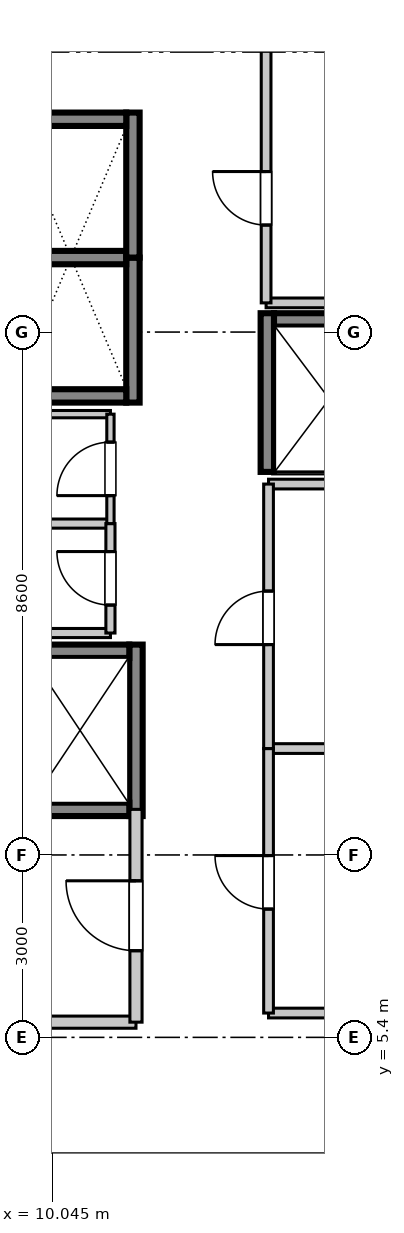
"""IFC4 building model, lengths in metres.
Left out: names, types, materials, properties, quantities, classifications, styles, units other than length and angle.
Written with IfcOpenShell. Run it as: python <this file> out.ifc"""

import sys

from ifc_helpers import new_model, si_unit, direction, frame, frame_2d, origin, place, context, subcontext, project, spatial, rectangle, extrude, source, transform, mapped, element, fill, save


model = new_model("IFC4")
c1 = context("Model", 3, precision=1e-05, world=origin(), true_north=direction((0.0, 1.0)))
c2 = subcontext(c1, "Body", "Model", "MODEL_VIEW")
j1 = project(units=[si_unit("LENGTHUNIT", "METRE"), si_unit("PLANEANGLEUNIT", "RADIAN")], contexts=[c1])
p1 = place(None, origin())
s1 = spatial("IfcSite", under=j1, at=p1, CompositionType="ELEMENT")
p2 = place(p1, origin())
s2 = spatial("IfcBuilding", under=s1, at=p2, CompositionType="ELEMENT")
p3 = place(p2, frame((0.0, 0.0, 300.35)))
s3 = spatial("IfcBuildingStorey", under=s2, at=p3, CompositionType="ELEMENT", Elevation=300.35)
m1 = source(origin(), c2, "Body", "SweptSolid", [
    extrude(rectangle(XDim=2.385, YDim=0.22, at=frame_2d((1.192, 0.0))), origin(), (0.0, 0.0, 1.0), 3.55),
])
p4 = place(p3, frame((11.37, 15.84, 0.0), z_axis=(0.0, 0.0, 1.0), x_axis=(0.0, 1.0, 0.0)))
e1 = element("IfcWall", 1, at=p4, inside=s3, PredefinedType="SHEAR", context=c2, shape_type="MappedRepresentation", body=[
    mapped(m1, transform((0.0, 0.0, 0.0), scale=1.0)),
])
m2 = source(origin(), c2, "Body", "SweptSolid", [
    extrude(rectangle(XDim=1.82, YDim=0.22, at=frame_2d((0.91, 0.0))), origin(), (0.0, 0.0, 1.0), 3.55),
])
p5 = place(p3, frame((9.44, 15.95, 0.0), z_axis=(0.0, 0.0, 1.0), x_axis=(1.0, 0.0, 0.0)))
e2 = element("IfcWall", 2, at=p5, inside=s3, PredefinedType="SHEAR", context=c2, shape_type="MappedRepresentation", body=[
    mapped(m2, transform((0.0, 0.0, 0.0), scale=1.0)),
])
m3 = source(origin(), c2, "Body", "SweptSolid", [
    extrude(rectangle(XDim=1.82, YDim=0.22, at=frame_2d((0.91, 0.0))), origin(), (0.0, 0.0, 1.0), 3.85),
])
p6 = place(p3, frame((9.44, 18.225, 0.0), z_axis=(0.0, 0.0, 1.0), x_axis=(1.0, 0.0, 0.0)))
e3 = element("IfcWall", 3, at=p6, inside=s3, PredefinedType="SHEAR", context=c2, shape_type="MappedRepresentation", body=[
    mapped(m3, transform((0.0, 0.0, 0.0), scale=1.0)),
])
p7 = place(p3, frame((11.37, 18.225, 0.0), z_axis=(0.0, 0.0, 1.0), x_axis=(0.0, 1.0, 0.0)))
e4 = element("IfcWall", 4, at=p7, inside=s3, PredefinedType="SHEAR", context=c2, shape_type="MappedRepresentation", body=[
    mapped(m1, transform((0.0, 0.0, 0.0), scale=1.0)),
])
p8 = place(p3, frame((9.44, 20.5, 0.0), z_axis=(0.0, 0.0, 1.0), x_axis=(1.0, 0.0, 0.0)))
e5 = element("IfcWall", 5, at=p8, inside=s3, PredefinedType="SHEAR", context=c2, shape_type="MappedRepresentation", body=[
    mapped(m2, transform((0.0, 0.0, 0.0), scale=1.0)),
])
m4 = source(origin(), c2, "Body", "SweptSolid", [
    extrude(rectangle(XDim=2.82, YDim=0.22, at=frame_2d((1.41, 0.0))), origin(), (0.0, 0.0, 1.0), 3.55),
])
p9 = place(p3, frame((11.42, 9.04, 0.0), z_axis=(0.0, 0.0, 1.0), x_axis=(0.0, 1.0, 0.0)))
e6 = element("IfcWall", 6, at=p9, inside=s3, PredefinedType="SHEAR", context=c2, shape_type="MappedRepresentation", body=[
    mapped(m4, transform((0.0, 0.0, 0.0), scale=1.0)),
])
m5 = source(origin(), c2, "Body", "SweptSolid", [
    extrude(rectangle(XDim=1.62, YDim=0.22, at=frame_2d((0.81, 0.0))), origin(), (0.0, 0.0, 1.0), 3.55),
])
for number, where, z_axis, x_axis in (
    (7, (9.69, 9.15, 0.0), (0.0, 0.0, 1.0), (1.0, 0.0, 0.0)),
    (8, (9.69, 11.75, 0.0), (0.0, 0.0, 1.0), (1.0, 0.0, 0.0)),
):
    element("IfcWall", number, at=place(p3, frame(where, z_axis=z_axis, x_axis=x_axis)), inside=s3, PredefinedType="SHEAR", context=c2, shape_type="MappedRepresentation", body=[
        mapped(m5, transform((0.0, 0.0, 0.0), scale=1.0)),
    ])
m6 = source(origin(), c2, "Body", "SweptSolid", [
    extrude(rectangle(XDim=2.61, YDim=0.22, at=frame_2d((1.305, 0.0))), origin(), (0.0, 0.0, 1.0), 3.55),
])
p10 = place(p3, frame((13.58, 14.7, 0.0), z_axis=(0.0, 0.0, 1.0), x_axis=(0.0, 1.0, 0.0)))
e9 = element("IfcWall", 9, at=p10, inside=s3, PredefinedType="SHEAR", context=c2, shape_type="MappedRepresentation", body=[
    mapped(m6, transform((0.0, 0.0, 0.0), scale=1.0)),
])
p11 = place(p3, frame((13.69, 17.2, 0.0), z_axis=(0.0, 0.0, 1.0), x_axis=(1.0, 0.0, 0.0)))
e10 = element("IfcWall", 10, at=p11, inside=s3, PredefinedType="SHEAR", context=c2, shape_type="MappedRepresentation", body=[
    mapped(m2, transform((0.0, 0.0, 0.0), scale=1.0)),
])
m7 = source(origin(), c2, "Body", "SweptSolid", [
    extrude(rectangle(XDim=3.82, YDim=0.2, at=frame_2d((1.91, 0.0))), origin(), (0.0, 0.0, 1.0), 2.89),
])
p12 = place(p3, frame((7.6, 5.65, 0.0), z_axis=(0.0, 0.0, 1.0), x_axis=(1.0, 0.0, 0.0)))
e11 = element("IfcWall", 11, at=p12, inside=s3, PredefinedType="PARTITIONING", context=c2, shape_type="MappedRepresentation", body=[
    mapped(m7, transform((0.0, 0.0, 0.0), scale=1.0)),
])
m8 = source(origin(), c2, "Body", "SweptSolid", [
    extrude(rectangle(XDim=3.5, YDim=0.2, at=frame_2d((1.75, 0.0))), origin(), (0.0, 0.0, 1.0), 2.89),
])
p13 = place(p3, frame((11.42, 5.65, 0.0), z_axis=(0.0, 0.0, 1.0), x_axis=(0.0, 1.0, 0.0)))
e12 = element("IfcWall", 12, at=p13, inside=s3, PredefinedType="PARTITIONING", context=c2, shape_type="MappedRepresentation", body=[
    mapped(m8, transform((0.0, 0.0, 0.0), scale=1.0)),
])
p14 = place(p13, frame((1.175, 0.0, 0.0)))
e13 = element("IfcOpeningElement", 13, at=p14, cuts=e12, PredefinedType="OPENING", context=c2, shape_type="SweptSolid", body=[
    extrude(rectangle(XDim=1.15, YDim=2.15, at=frame_2d((0.575, 1.075))), frame((0.0, 0.11, 0.0), z_axis=(0.0, -1.0, 0.0), x_axis=(1.0, 0.0, 0.0)), (0.0, 0.0, 1.0), 0.22),
])
m9 = source(origin(), c2, "Body", "SweptSolid", [
    extrude(rectangle(XDim=1.75, YDim=0.15, at=frame_2d((0.875, 0.0))), origin(), (0.0, 0.0, 1.0), 2.89),
])
for number, where, z_axis, x_axis in (
    (14, (9.25, 12.05, 0.0), (0.0, 0.0, 1.0), (1.0, 0.0, 0.0)),
    (15, (9.25, 13.85, 0.0), (0.0, 0.0, 1.0), (1.0, 0.0, 0.0)),
):
    element("IfcWall", number, at=place(p3, frame(where, z_axis=z_axis, x_axis=x_axis)), inside=s3, PredefinedType="PARTITIONING", context=c2, shape_type="MappedRepresentation", body=[
        mapped(m9, transform((0.0, 0.0, 0.0), scale=1.0)),
    ])
m10 = source(origin(), c2, "Body", "SweptSolid", [
    extrude(rectangle(XDim=1.8, YDim=0.15, at=frame_2d((0.9, 0.0))), origin(), (0.0, 0.0, 1.0), 2.89),
])
p15 = place(p3, frame((11.0, 12.05, 0.0), z_axis=(0.0, 0.0, 1.0), x_axis=(0.0, 1.0, 0.0)))
e16 = element("IfcWall", 16, at=p15, inside=s3, PredefinedType="PARTITIONING", context=c2, shape_type="MappedRepresentation", body=[
    mapped(m10, transform((0.0, 0.0, 0.0), scale=1.0)),
])
p16 = place(p15, frame((0.46, 0.0, 0.0)))
e17 = element("IfcOpeningElement", 17, at=p16, cuts=e16, PredefinedType="OPENING", context=c2, shape_type="SweptSolid", body=[
    extrude(rectangle(XDim=0.88, YDim=2.1, at=frame_2d((0.44, 1.05))), frame((0.0, 0.085, 0.0), z_axis=(0.0, -1.0, 0.0), x_axis=(1.0, 0.0, 0.0)), (0.0, 0.0, 1.0), 0.17),
])
m11 = source(origin(), c2, "Body", "SweptSolid", [
    extrude(rectangle(XDim=1.75, YDim=0.12, at=frame_2d((0.875, 0.0))), origin(), (0.0, 0.0, 1.0), 2.89),
])
p17 = place(p3, frame((9.25, 15.65, 0.0), z_axis=(0.0, 0.0, 1.0), x_axis=(1.0, 0.0, 0.0)))
e18 = element("IfcWall", 18, at=p17, inside=s3, PredefinedType="PARTITIONING", context=c2, shape_type="MappedRepresentation", body=[
    mapped(m11, transform((0.0, 0.0, 0.0), scale=1.0)),
])
m12 = source(origin(), c2, "Body", "SweptSolid", [
    extrude(rectangle(XDim=1.8, YDim=0.12, at=frame_2d((0.9, 0.0))), origin(), (0.0, 0.0, 1.0), 2.89),
])
p18 = place(p3, frame((11.0, 13.85, 0.0), z_axis=(0.0, 0.0, 1.0), x_axis=(0.0, 1.0, 0.0)))
e19 = element("IfcWall", 19, at=p18, inside=s3, PredefinedType="PARTITIONING", context=c2, shape_type="MappedRepresentation", body=[
    mapped(m12, transform((0.0, 0.0, 0.0), scale=1.0)),
])
p19 = place(p18, frame((0.46, 0.0, 0.0)))
e20 = element("IfcOpeningElement", 20, at=p19, cuts=e19, PredefinedType="OPENING", context=c2, shape_type="SweptSolid", body=[
    extrude(rectangle(XDim=0.88, YDim=2.1, at=frame_2d((0.44, 1.05))), frame((0.0, 0.07, 0.0), z_axis=(0.0, -1.0, 0.0), x_axis=(1.0, 0.0, 0.0)), (0.0, 0.0, 1.0), 0.14),
])
m13 = source(origin(), c2, "Body", "SweptSolid", [
    extrude(rectangle(XDim=2.05, YDim=0.16, at=frame_2d((1.025, 0.0))), origin(), (0.0, 0.0, 1.0), 2.89),
])
for number, where, z_axis, x_axis in (
    (21, (13.6, 5.8, 0.0), (0.0, 0.0, 1.0), (1.0, 0.0, 0.0)),
    (22, (13.6, 10.15, 0.0), (0.0, 0.0, 1.0), (1.0, 0.0, 0.0)),
):
    element("IfcWall", number, at=place(p3, frame(where, z_axis=z_axis, x_axis=x_axis)), inside=s3, PredefinedType="PARTITIONING", context=c2, shape_type="MappedRepresentation", body=[
        mapped(m13, transform((0.0, 0.0, 0.0), scale=1.0)),
    ])
m14 = source(origin(), c2, "Body", "SweptSolid", [
    extrude(rectangle(XDim=4.35, YDim=0.16, at=frame_2d((2.175, 0.0))), origin(), (0.0, 0.0, 1.0), 2.89),
])
p20 = place(p3, frame((13.6, 5.8, 0.0), z_axis=(0.0, 0.0, 1.0), x_axis=(0.0, 1.0, 0.0)))
e23 = element("IfcWall", 23, at=p20, inside=s3, PredefinedType="PARTITIONING", context=c2, shape_type="MappedRepresentation", body=[
    mapped(m14, transform((0.0, 0.0, 0.0), scale=1.0)),
])
p21 = place(p20, frame((1.71, 0.0, 0.0)))
e24 = element("IfcOpeningElement", 24, at=p21, cuts=e23, PredefinedType="OPENING", context=c2, shape_type="SweptSolid", body=[
    extrude(rectangle(XDim=0.88, YDim=2.1, at=frame_2d((0.44, 1.05))), frame((0.0, 0.09, 0.0), z_axis=(0.0, -1.0, 0.0), x_axis=(1.0, 0.0, 0.0)), (0.0, 0.0, 1.0), 0.18),
])
p22 = place(p3, frame((13.6, 14.5, 0.0), z_axis=(0.0, 0.0, 1.0), x_axis=(1.0, 0.0, 0.0)))
e25 = element("IfcWall", 25, at=p22, inside=s3, PredefinedType="PARTITIONING", context=c2, shape_type="MappedRepresentation", body=[
    mapped(m13, transform((0.0, 0.0, 0.0), scale=1.0)),
])
m15 = source(origin(), c2, "Body", "SweptSolid", [
    extrude(rectangle(XDim=4.35, YDim=0.16, at=frame_2d((2.175, 0.0))), origin(), (0.0, 0.0, 1.0), 2.89),
])
p23 = place(p3, frame((13.6, 10.15, 0.0), z_axis=(0.0, 0.0, 1.0), x_axis=(0.0, 1.0, 0.0)))
e26 = element("IfcWall", 26, at=p23, inside=s3, PredefinedType="PARTITIONING", context=c2, shape_type="MappedRepresentation", body=[
    mapped(m15, transform((0.0, 0.0, 0.0), scale=1.0)),
])
p24 = place(p23, frame((1.71, 0.0, 0.0)))
e27 = element("IfcOpeningElement", 27, at=p24, cuts=e26, PredefinedType="OPENING", context=c2, shape_type="SweptSolid", body=[
    extrude(rectangle(XDim=0.88, YDim=2.1, at=frame_2d((0.44, 1.05))), frame((0.0, 0.09, 0.0), z_axis=(0.0, -1.0, 0.0), x_axis=(1.0, 0.0, 0.0)), (0.0, 0.0, 1.0), 0.18),
])
m16 = source(origin(), c2, "Body", "SweptSolid", [
    extrude(rectangle(XDim=2.99, YDim=0.16, at=frame_2d((1.495, 0.0))), origin(), (0.0, 0.0, 1.0), 2.89),
])
p25 = place(p3, frame((13.56, 17.48, 0.0), z_axis=(0.0, 0.0, 1.0), x_axis=(1.0, 0.0, 0.0)))
e28 = element("IfcWall", 28, at=p25, inside=s3, PredefinedType="PARTITIONING", context=c2, shape_type="MappedRepresentation", body=[
    mapped(m16, transform((0.0, 0.0, 0.0), scale=1.0)),
])
m17 = source(origin(), c2, "Body", "SweptSolid", [
    extrude(rectangle(XDim=4.82, YDim=0.16, at=frame_2d((2.41, 0.0))), origin(), (0.0, 0.0, 1.0), 2.89),
])
p26 = place(p3, frame((13.56, 17.48, 0.0), z_axis=(0.0, 0.0, 1.0), x_axis=(0.0, 1.0, 0.0)))
e29 = element("IfcWall", 29, at=p26, inside=s3, PredefinedType="PARTITIONING", context=c2, shape_type="MappedRepresentation", body=[
    mapped(m17, transform((0.0, 0.0, 0.0), scale=1.0)),
])
p27 = place(p26, frame((1.28, 0.0, 0.0)))
e30 = element("IfcOpeningElement", 30, at=p27, cuts=e29, PredefinedType="OPENING", context=c2, shape_type="SweptSolid", body=[
    extrude(rectangle(XDim=0.88, YDim=2.1, at=frame_2d((0.44, 1.05))), frame((0.0, 0.09, 0.0), z_axis=(0.0, -1.0, 0.0), x_axis=(1.0, 0.0, 0.0)), (0.0, 0.0, 1.0), 0.18),
])
m18 = source(origin(), c2, "Body", "SweptSolid", [
    extrude(rectangle(XDim=1.15, YDim=2.15, at=frame_2d((0.575, 1.075))), frame((0.0, 0.025, 0.0), z_axis=(0.0, -1.0, 0.0), x_axis=(1.0, 0.0, 0.0)), (0.0, 0.0, 1.0), 0.05),
])
p28 = place(p14, frame((1.15, 0.0, 0.0), z_axis=(0.0, 0.0, 1.0), x_axis=(-1.0, 0.0, 0.0)))
e31 = element("IfcDoor", 31, at=p28, inside=s3, OperationType="SINGLE_SWING_RIGHT", PredefinedType="DOOR", context=c2, shape_type="MappedRepresentation", body=[
    mapped(m18, transform((0.0, 0.0, 0.0), scale=1.0)),
])
fill(e13, e31)
m19 = source(origin(), c2, "Body", "SweptSolid", [
    extrude(rectangle(XDim=0.88, YDim=2.1, at=frame_2d((0.44, 1.05))), frame((0.0, 0.025, 0.0), z_axis=(0.0, -1.0, 0.0), x_axis=(1.0, 0.0, 0.0)), (0.0, 0.0, 1.0), 0.05),
])
p29 = place(p16, origin())
e32 = element("IfcDoor", 32, at=p29, inside=s3, OperationType="SINGLE_SWING_RIGHT", PredefinedType="DOOR", context=c2, shape_type="MappedRepresentation", body=[
    mapped(m19, transform((0.0, 0.0, 0.0), scale=1.0)),
])
fill(e17, e32)
p30 = place(p19, origin())
e33 = element("IfcDoor", 33, at=p30, inside=s3, OperationType="SINGLE_SWING_LEFT", PredefinedType="DOOR", context=c2, shape_type="MappedRepresentation", body=[
    mapped(m19, transform((0.0, 0.0, 0.0), scale=1.0)),
])
fill(e20, e33)
p31 = place(p21, frame((0.88, 0.0, 0.0), z_axis=(0.0, 0.0, 1.0), x_axis=(-1.0, 0.0, 0.0)))
e34 = element("IfcDoor", 34, at=p31, inside=s3, OperationType="SINGLE_SWING_RIGHT", PredefinedType="DOOR", context=c2, shape_type="MappedRepresentation", body=[
    mapped(m19, transform((0.0, 0.0, 0.0), scale=1.0)),
])
fill(e24, e34)
p32 = place(p24, frame((0.88, 0.0, 0.0), z_axis=(0.0, 0.0, 1.0), x_axis=(-1.0, 0.0, 0.0)))
e35 = element("IfcDoor", 35, at=p32, inside=s3, OperationType="SINGLE_SWING_LEFT", PredefinedType="DOOR", context=c2, shape_type="MappedRepresentation", body=[
    mapped(m19, transform((0.0, 0.0, 0.0), scale=1.0)),
])
fill(e27, e35)
p33 = place(p27, frame((0.88, 0.0, 0.0), z_axis=(0.0, 0.0, 1.0), x_axis=(-1.0, 0.0, 0.0)))
e36 = element("IfcDoor", 36, at=p33, inside=s3, OperationType="SINGLE_SWING_RIGHT", PredefinedType="DOOR", context=c2, shape_type="MappedRepresentation", body=[
    mapped(m19, transform((0.0, 0.0, 0.0), scale=1.0)),
])
fill(e30, e36)
save(model, sys.argv[1])
